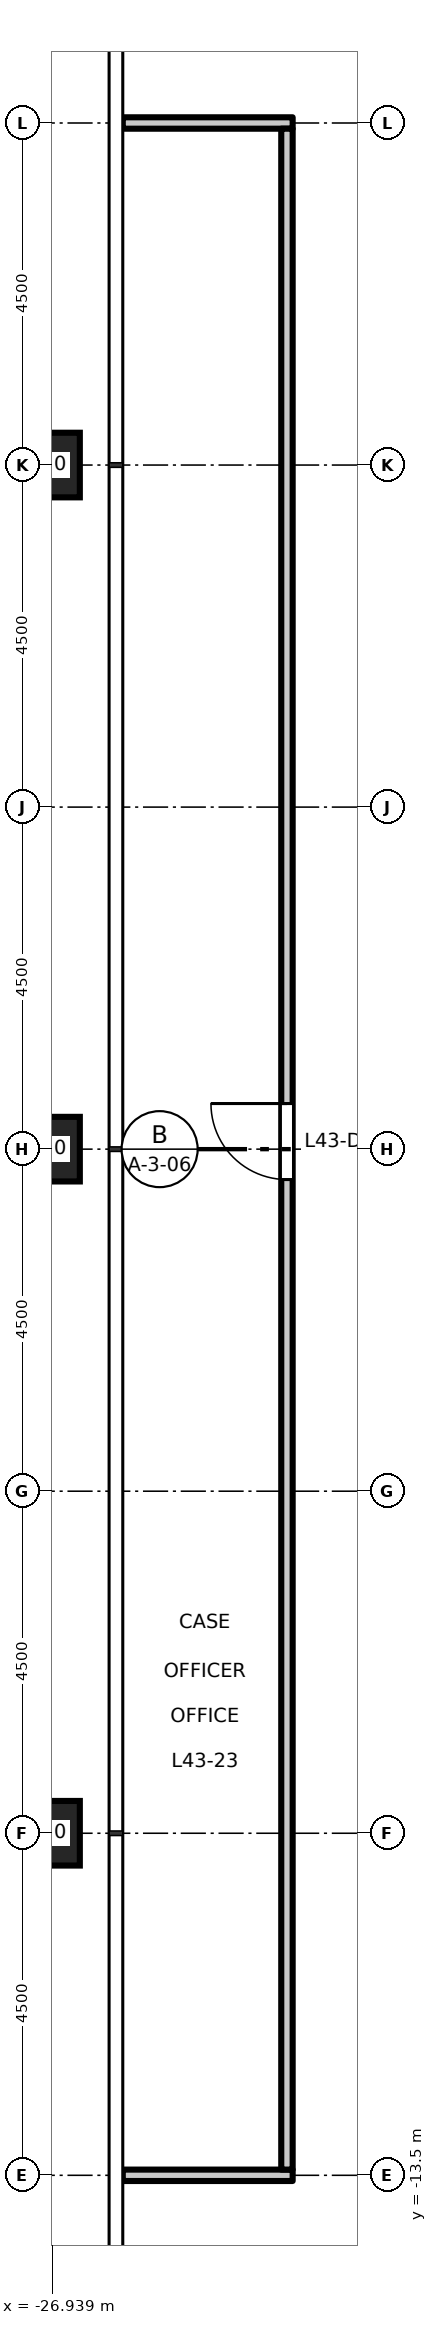
"""IFC4 building model, lengths in metres.
Left out: names, types, materials, properties, quantities, classifications, styles, units other than length and angle.
Written with IfcOpenShell. Run it as: python <this file> out.ifc"""

import sys

from ifc_helpers import new_model, si_unit, direction, frame, frame_2d, origin, origin_2d, place, context, subcontext, project, spatial, rectangle, hollow_rectangle, extrude, element, fill, save


model = new_model("IFC4")
c1 = context("Model", 3, precision=1e-05, world=origin(), true_north=direction((0.0, 1.0)))
c2 = subcontext(c1, "Body", "Model", "MODEL_VIEW")
j1 = project(units=[si_unit("LENGTHUNIT", "METRE"), si_unit("PLANEANGLEUNIT", "RADIAN")], contexts=[c1])
p1 = place(None, origin())
s1 = spatial("IfcSite", under=j1, at=p1, CompositionType="ELEMENT")
p2 = place(p1, origin())
s2 = spatial("IfcBuilding", under=s1, at=p2, CompositionType="ELEMENT")
p3 = place(p2, frame((0.0, 0.0, 201.7)))
s3 = spatial("IfcBuildingStorey", under=s2, at=p3, CompositionType="ELEMENT", Elevation=201.7)
for number, where, z_axis, x_axis in (
    (1, (-27.0, 9.0, 0.0), (0.0, 0.0, 1.0), (1.0, 0.0, 0.0)),
    (2, (-27.0, 0.0, 0.0), (0.0, 0.0, 1.0), (1.0, 0.0, 0.0)),
    (3, (-27.0, -9.0, 0.0), (0.0, 0.0, 1.0), (1.0, 0.0, 0.0)),
):
    element("IfcColumn", number, at=place(p3, frame(where, z_axis=z_axis, x_axis=x_axis)), inside=s3, PredefinedType="COLUMN", context=c2, shape_type="SweptSolid", body=[
        extrude(hollow_rectangle(XDim=0.85, YDim=0.85, WallThickness=0.05, at=origin_2d()), origin(), (0.0, 0.0, 1.0), 4.5),
    ])
p4 = place(p3, frame((-26.01, -13.5, 0.0), z_axis=(0.0, 0.0, 1.0), x_axis=(1.0, 0.0, 0.0)))
e4 = element("IfcWall", 4, at=p4, inside=s3, PredefinedType="PARTITIONING", context=c2, shape_type="SweptSolid", body=[
    extrude(rectangle(XDim=2.235, YDim=0.15, at=frame_2d((1.118, 0.0))), origin(), (0.0, 0.0, 1.0), 3.95),
])
p5 = place(p3, frame((-26.01, 13.5, 0.0), z_axis=(0.0, 0.0, 1.0), x_axis=(1.0, 0.0, 0.0)))
e5 = element("IfcWall", 5, at=p5, inside=s3, PredefinedType="PARTITIONING", context=c2, shape_type="SweptSolid", body=[
    extrude(rectangle(XDim=2.235, YDim=0.15, at=frame_2d((1.118, 0.0))), origin(), (0.0, 0.0, 1.0), 4.35),
])
p6 = place(p3, frame((-23.85, -13.425, 0.0), z_axis=(0.0, 0.0, 1.0), x_axis=(0.0, 1.0, 0.0)))
e6 = element("IfcWall", 6, at=p6, inside=s3, PredefinedType="PARTITIONING", context=c2, shape_type="SweptSolid", body=[
    extrude(rectangle(XDim=26.85, YDim=0.15, at=frame_2d((13.425, 0.0))), origin(), (0.0, 0.0, 1.0), 4.35),
])
p7 = place(p6, frame((13.025, 0.0, 0.0)))
e7 = element("IfcOpeningElement", 7, at=p7, cuts=e6, PredefinedType="OPENING", context=c2, shape_type="SweptSolid", body=[
    extrude(rectangle(XDim=1.0, YDim=2.1, at=frame_2d((0.5, 1.05))), frame((0.0, 0.085, 0.0), z_axis=(0.0, -1.0, 0.0), x_axis=(1.0, 0.0, 0.0)), (0.0, 0.0, 1.0), 0.17),
])
p8 = place(p7, origin())
e8 = element("IfcDoor", 8, at=p8, inside=s3, OperationType="SINGLE_SWING_RIGHT", PredefinedType="DOOR", context=c2, shape_type="SweptSolid", body=[
    extrude(rectangle(XDim=1.0, YDim=2.1, at=frame_2d((0.5, 1.05))), frame((0.0, 0.025, 0.0), z_axis=(0.0, -1.0, 0.0), x_axis=(1.0, 0.0, 0.0)), (0.0, 0.0, 1.0), 0.05),
])
fill(e7, e8)
save(model, sys.argv[1])
